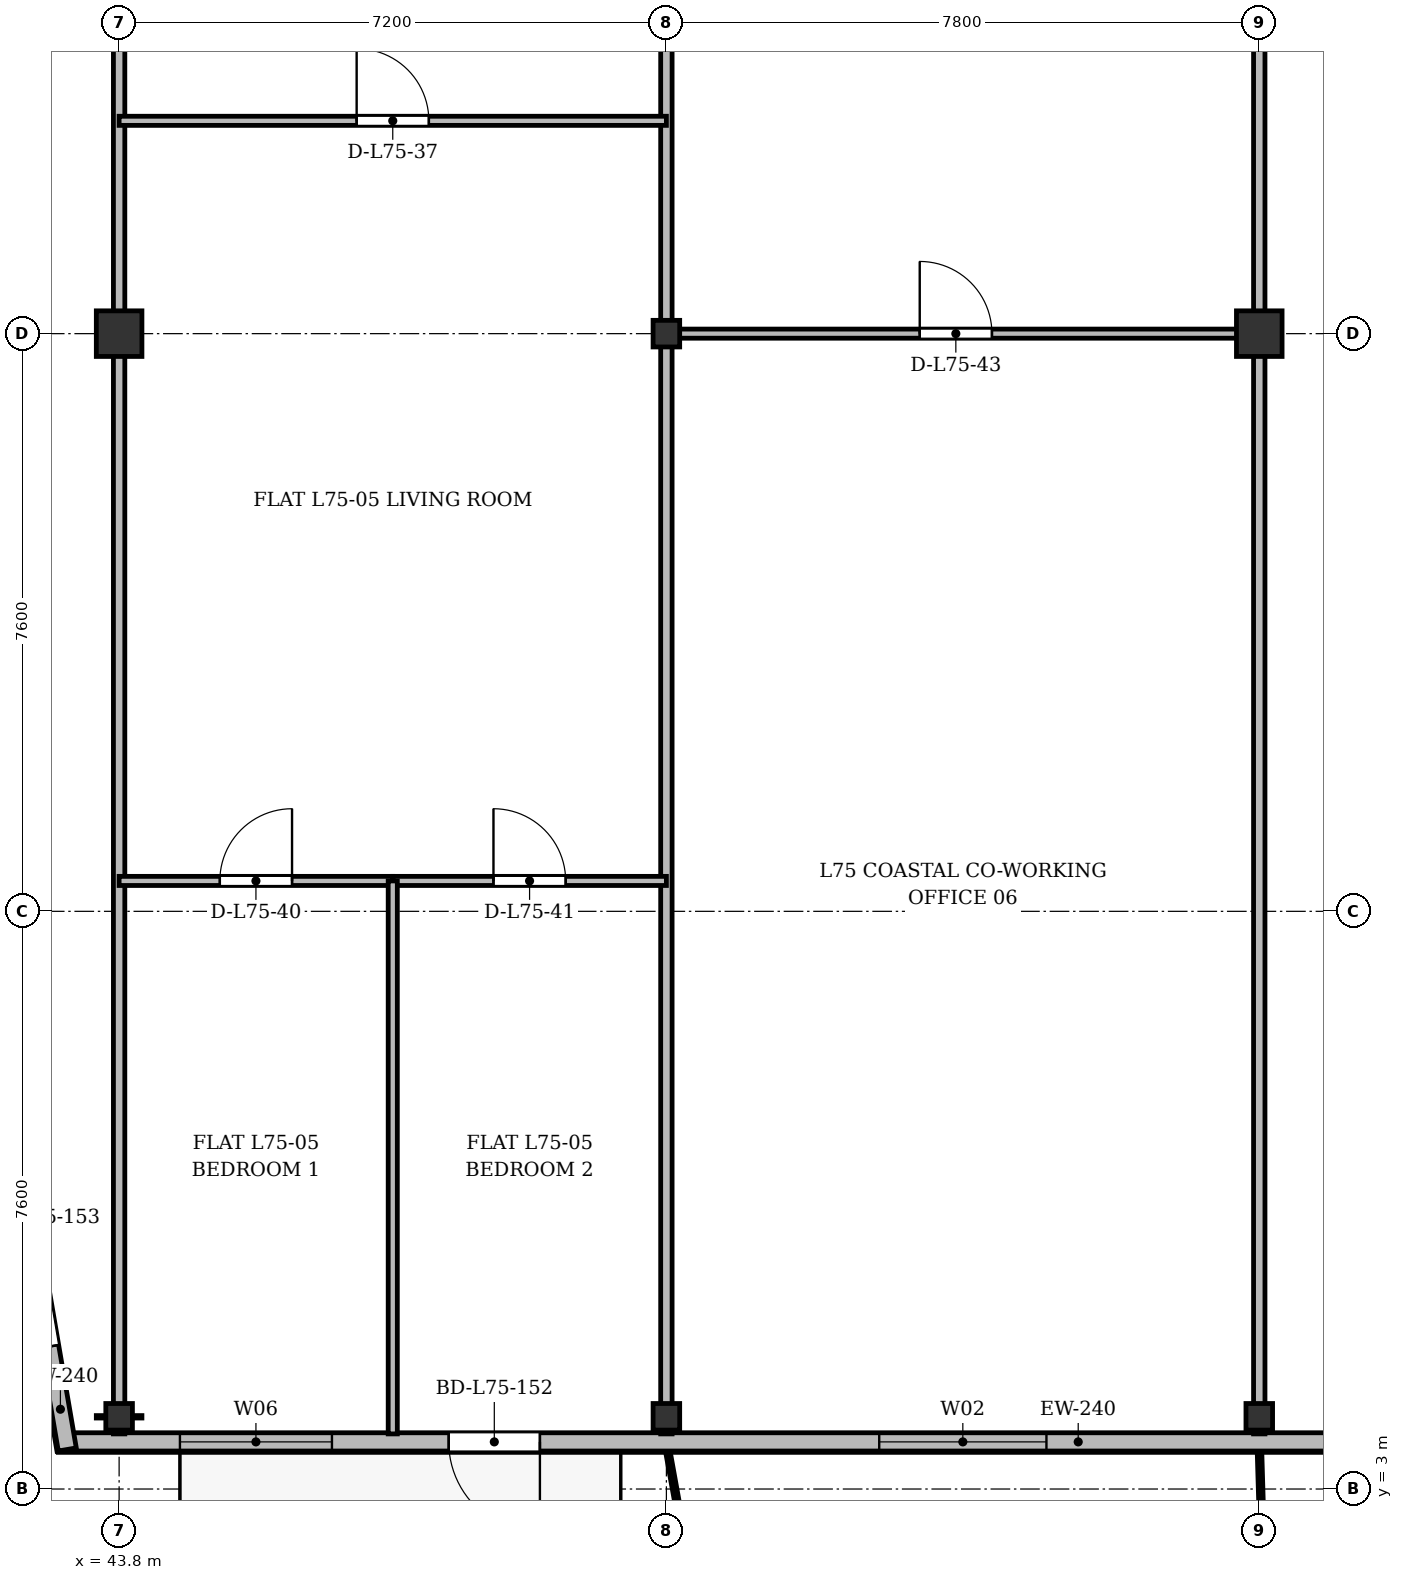
"""IFC4 building model, lengths in metres.
Left out: names, types, materials, properties, quantities, classifications, styles, units other than length and angle.
Written with IfcOpenShell. Run it as: python <this file> out.ifc"""

import sys

from ifc_helpers import new_model, si_unit, direction, frame, frame_2d, origin, origin_2d, place, context, subcontext, project, spatial, rectangle, i_section, extrude, source, transform, mapped, element, fill, save


model = new_model("IFC4")
c1 = context("Model", 3, precision=1e-05, world=origin(), true_north=direction((0.0, 1.0)))
c2 = subcontext(c1, "Body", "Model", "MODEL_VIEW")
j1 = project(units=[si_unit("LENGTHUNIT", "METRE"), si_unit("PLANEANGLEUNIT", "RADIAN")], contexts=[c1])
p1 = place(None, origin())
s1 = spatial("IfcSite", under=j1, at=p1, CompositionType="ELEMENT")
p2 = place(p1, origin())
s2 = spatial("IfcBuilding", under=s1, at=p2, CompositionType="ELEMENT")
p3 = place(p2, frame((0.0, 0.0, 288.3)))
s3 = spatial("IfcBuildingStorey", under=s2, at=p3, CompositionType="ELEMENT", Elevation=288.3)
m1 = source(origin(), c2, "Body", "SweptSolid", [
    extrude(i_section(OverallWidth=0.35, OverallDepth=0.35, WebThickness=0.018, FlangeThickness=0.028, at=origin_2d()), origin(), (0.0, 0.0, 1.0), 3.6),
])
p4 = place(p3, frame((43.8, 3.95, 0.0), z_axis=(0.0, 0.0, 1.0), x_axis=(1.0, 0.0, 0.0)))
e1 = element("IfcColumn", 1, at=p4, inside=s3, PredefinedType="COLUMN", context=c2, shape_type="MappedRepresentation", body=[
    mapped(m1, transform((0.0, 0.0, 0.0), x_axis=(1.0, 0.0, 0.0), y_axis=(0.0, 1.0, 0.0), z_axis=(0.0, 0.0, 1.0), scale=1.0)),
])
m2 = source(origin(), c2, "Body", "SweptSolid", [
    extrude(rectangle(XDim=0.6, YDim=0.6, at=origin_2d()), origin(), (0.0, 0.0, 1.0), 3.6),
])
p5 = place(p3, frame((43.8, 18.2, 0.0), z_axis=(0.0, 0.0, 1.0), x_axis=(1.0, 0.0, 0.0)))
e2 = element("IfcColumn", 2, at=p5, inside=s3, PredefinedType="COLUMN", context=c2, shape_type="MappedRepresentation", body=[
    mapped(m2, transform((0.0, 0.0, 0.0), x_axis=(1.0, 0.0, 0.0), y_axis=(0.0, 1.0, 0.0), z_axis=(0.0, 0.0, 1.0), scale=1.0)),
])
for number, where, z_axis, x_axis in (
    (3, (51.0, 3.95, 0.0), (0.0, 0.0, 1.0), (1.0, 0.0, 0.0)),
    (4, (51.0, 18.2, 0.0), (0.0, 0.0, 1.0), (1.0, 0.0, 0.0)),
    (5, (58.8, 3.95, 0.0), (0.0, 0.0, 1.0), (1.0, 0.0, 0.0)),
):
    element("IfcColumn", number, at=place(p3, frame(where, z_axis=z_axis, x_axis=x_axis)), inside=s3, PredefinedType="COLUMN", context=c2, shape_type="MappedRepresentation", body=[
        mapped(m1, transform((0.0, 0.0, 0.0), x_axis=(1.0, 0.0, 0.0), y_axis=(0.0, 1.0, 0.0), z_axis=(0.0, 0.0, 1.0), scale=1.0)),
    ])
p6 = place(p3, frame((58.8, 18.2, 0.0), z_axis=(0.0, 0.0, 1.0), x_axis=(1.0, 0.0, 0.0)))
e6 = element("IfcColumn", 6, at=p6, inside=s3, PredefinedType="COLUMN", context=c2, shape_type="MappedRepresentation", body=[
    mapped(m2, transform((0.0, 0.0, 0.0), x_axis=(1.0, 0.0, 0.0), y_axis=(0.0, 1.0, 0.0), z_axis=(0.0, 0.0, 1.0), scale=1.0)),
])
p7 = place(p3, frame((63.2, 3.62, 0.0), z_axis=(0.0, 0.0, 1.0), x_axis=(-1.0, 0.0, 0.0)))
e7 = element("IfcWall", 7, at=p7, inside=s3, PredefinedType="SOLIDWALL", context=c2, shape_type="SweptSolid", body=[
    extrude(rectangle(XDim=20.2, YDim=0.24, at=frame_2d((10.1, 0.0))), origin(), (0.0, 0.0, 1.0), 3.37),
])
p8 = place(p7, frame((1.345, 0.0, 0.9)))
e8 = element("IfcOpeningElement", 8, at=p8, cuts=e7, PredefinedType="OPENING", context=c2, shape_type="SweptSolid", body=[
    extrude(rectangle(XDim=1.8, YDim=1.8, at=frame_2d((0.9, 0.9))), frame((0.0, 0.13, 0.0), z_axis=(0.0, -1.0, 0.0), x_axis=(1.0, 0.0, 0.0)), (0.0, 0.0, 1.0), 0.26),
])
p9 = place(p7, frame((7.2, 0.0, 0.9)))
e9 = element("IfcOpeningElement", 9, at=p9, cuts=e7, PredefinedType="OPENING", context=c2, shape_type="SweptSolid", body=[
    extrude(rectangle(XDim=2.2, YDim=1.8, at=frame_2d((1.1, 0.9))), frame((0.0, 0.13, 0.0), z_axis=(0.0, -1.0, 0.0), x_axis=(1.0, 0.0, 0.0)), (0.0, 0.0, 1.0), 0.26),
])
p10 = place(p7, frame((13.864, 0.0, 0.0)))
e10 = element("IfcOpeningElement", 10, at=p10, cuts=e7, PredefinedType="OPENING", context=c2, shape_type="SweptSolid", body=[
    extrude(rectangle(XDim=1.2, YDim=2.2, at=frame_2d((0.6, 1.1))), frame((0.0, 0.13, 0.0), z_axis=(0.0, -1.0, 0.0), x_axis=(1.0, 0.0, 0.0)), (0.0, 0.0, 1.0), 0.26),
])
p11 = place(p7, frame((16.6, 0.0, 0.9)))
e11 = element("IfcOpeningElement", 11, at=p11, cuts=e7, PredefinedType="OPENING", context=c2, shape_type="SweptSolid", body=[
    extrude(rectangle(XDim=2.0, YDim=1.95, at=frame_2d((1.0, 0.975))), frame((0.0, 0.13, 0.0), z_axis=(0.0, -1.0, 0.0), x_axis=(1.0, 0.0, 0.0)), (0.0, 0.0, 1.0), 0.26),
])
p12 = place(p3, frame((43.118, 3.52, 0.0), z_axis=(0.0, 0.0, 1.0), x_axis=(-0.168990530437, 0.98561767467, 0.0)))
e12 = element("IfcWall", 12, at=p12, inside=s3, PredefinedType="SOLIDWALL", context=c2, shape_type="SweptSolid", body=[
    extrude(rectangle(XDim=3.551, YDim=0.24, at=frame_2d((1.775, 0.0))), origin(), (0.0, 0.0, 1.0), 2.92),
])
p13 = place(p12, frame((1.374, 0.0, 0.0)))
e13 = element("IfcOpeningElement", 13, at=p13, cuts=e12, PredefinedType="OPENING", context=c2, shape_type="SweptSolid", body=[
    extrude(rectangle(XDim=1.2, YDim=2.2, at=frame_2d((0.6, 1.1))), frame((0.0, 0.13, 0.0), z_axis=(0.0, -1.0, 0.0), x_axis=(1.0, 0.0, 0.0)), (0.0, 0.0, 1.0), 0.26),
])
for number, where, z_axis, x_axis in (
    (14, (43.8, 3.725, 0.0), (0.0, 0.0, 1.0), (0.0, 1.0, 0.0)),
    (15, (51.0, 3.725, 0.0), (0.0, 0.0, 1.0), (0.0, 1.0, 0.0)),
    (16, (58.8, 3.725, 0.0), (0.0, 0.0, 1.0), (0.0, 1.0, 0.0)),
):
    element("IfcWall", number, at=place(p3, frame(where, z_axis=z_axis, x_axis=x_axis)), inside=s3, PredefinedType="PARTITIONING", context=c2, shape_type="SweptSolid", body=[
        extrude(rectangle(XDim=27.275, YDim=0.15, at=frame_2d((13.637, 0.0))), origin(), (0.0, 0.0, 1.0), 2.87),
    ])
p14 = place(p3, frame((43.8, 21.0, 0.0), z_axis=(0.0, 0.0, 1.0), x_axis=(1.0, 0.0, 0.0)))
e17 = element("IfcWall", 17, at=p14, inside=s3, PredefinedType="PARTITIONING", context=c2, shape_type="SweptSolid", body=[
    extrude(rectangle(XDim=7.2, YDim=0.12, at=frame_2d((3.6, 0.0))), origin(), (0.0, 0.0, 1.0), 2.87),
])
p15 = place(p14, frame((3.125, 0.0, 0.0)))
e18 = element("IfcOpeningElement", 18, at=p15, cuts=e17, PredefinedType="OPENING", context=c2, shape_type="SweptSolid", body=[
    extrude(rectangle(XDim=0.95, YDim=2.15, at=frame_2d((0.475, 1.075))), frame((0.0, 0.07, 0.0), z_axis=(0.0, -1.0, 0.0), x_axis=(1.0, 0.0, 0.0)), (0.0, 0.0, 1.0), 0.14),
])
p16 = place(p3, frame((43.8, 11.0, 0.0), z_axis=(0.0, 0.0, 1.0), x_axis=(1.0, 0.0, 0.0)))
e19 = element("IfcWall", 19, at=p16, inside=s3, PredefinedType="PARTITIONING", context=c2, shape_type="SweptSolid", body=[
    extrude(rectangle(XDim=3.6, YDim=0.12, at=frame_2d((1.8, 0.0))), origin(), (0.0, 0.0, 1.0), 2.87),
])
p17 = place(p16, frame((1.325, 0.0, 0.0)))
e20 = element("IfcOpeningElement", 20, at=p17, cuts=e19, PredefinedType="OPENING", context=c2, shape_type="SweptSolid", body=[
    extrude(rectangle(XDim=0.95, YDim=2.15, at=frame_2d((0.475, 1.075))), frame((0.0, 0.07, 0.0), z_axis=(0.0, -1.0, 0.0), x_axis=(1.0, 0.0, 0.0)), (0.0, 0.0, 1.0), 0.14),
])
p18 = place(p3, frame((47.4, 11.0, 0.0), z_axis=(0.0, 0.0, 1.0), x_axis=(1.0, 0.0, 0.0)))
e21 = element("IfcWall", 21, at=p18, inside=s3, PredefinedType="PARTITIONING", context=c2, shape_type="SweptSolid", body=[
    extrude(rectangle(XDim=3.6, YDim=0.12, at=frame_2d((1.8, 0.0))), origin(), (0.0, 0.0, 1.0), 2.87),
])
p19 = place(p18, frame((1.325, 0.0, 0.0)))
e22 = element("IfcOpeningElement", 22, at=p19, cuts=e21, PredefinedType="OPENING", context=c2, shape_type="SweptSolid", body=[
    extrude(rectangle(XDim=0.95, YDim=2.15, at=frame_2d((0.475, 1.075))), frame((0.0, 0.07, 0.0), z_axis=(0.0, -1.0, 0.0), x_axis=(1.0, 0.0, 0.0)), (0.0, 0.0, 1.0), 0.14),
])
p20 = place(p3, frame((47.4, 3.725, 0.0), z_axis=(0.0, 0.0, 1.0), x_axis=(0.0, 1.0, 0.0)))
e23 = element("IfcWall", 23, at=p20, inside=s3, PredefinedType="PARTITIONING", context=c2, shape_type="SweptSolid", body=[
    extrude(rectangle(XDim=7.275, YDim=0.12, at=frame_2d((3.637, 0.0))), origin(), (0.0, 0.0, 1.0), 2.92),
])
p21 = place(p3, frame((51.0, 18.2, 0.0), z_axis=(0.0, 0.0, 1.0), x_axis=(1.0, 0.0, 0.0)))
e24 = element("IfcWall", 24, at=p21, inside=s3, PredefinedType="PARTITIONING", context=c2, shape_type="SweptSolid", body=[
    extrude(rectangle(XDim=7.8, YDim=0.12, at=frame_2d((3.9, 0.0))), origin(), (0.0, 0.0, 1.0), 2.92),
])
p22 = place(p21, frame((3.333, 0.0, 0.0)))
e25 = element("IfcOpeningElement", 25, at=p22, cuts=e24, PredefinedType="OPENING", context=c2, shape_type="SweptSolid", body=[
    extrude(rectangle(XDim=0.95, YDim=2.15, at=frame_2d((0.475, 1.075))), frame((0.0, 0.07, 0.0), z_axis=(0.0, -1.0, 0.0), x_axis=(1.0, 0.0, 0.0)), (0.0, 0.0, 1.0), 0.14),
])
m3 = source(origin(), c2, "Body", "SweptSolid", [
    extrude(rectangle(XDim=2.2, YDim=1.8, at=frame_2d((1.1, 0.9))), frame((0.0, 0.03, 0.0), z_axis=(0.0, -1.0, 0.0), x_axis=(1.0, 0.0, 0.0)), (0.0, 0.0, 1.0), 0.06),
])
p23 = place(p9, origin())
e26 = element("IfcWindow", 26, at=p23, inside=s3, PartitioningType="SINGLE_PANEL", PredefinedType="WINDOW", context=c2, shape_type="MappedRepresentation", body=[
    mapped(m3, transform((0.0, 0.0, 0.0), x_axis=(1.0, 0.0, 0.0), y_axis=(0.0, 1.0, 0.0), z_axis=(0.0, 0.0, 1.0), scale=1.0)),
])
fill(e9, e26)
m4 = source(origin(), c2, "Body", "SweptSolid", [
    extrude(rectangle(XDim=1.2, YDim=2.2, at=frame_2d((0.6, 1.1))), frame((0.0, 0.025, 0.0), z_axis=(0.0, -1.0, 0.0), x_axis=(1.0, 0.0, 0.0)), (0.0, 0.0, 1.0), 0.05),
])
p24 = place(p10, origin())
e27 = element("IfcDoor", 27, at=p24, inside=s3, OperationType="SINGLE_SWING_LEFT", PredefinedType="DOOR", context=c2, shape_type="MappedRepresentation", body=[
    mapped(m4, transform((0.0, 0.0, 0.0), x_axis=(1.0, 0.0, 0.0), y_axis=(0.0, 1.0, 0.0), z_axis=(0.0, 0.0, 1.0), scale=1.0)),
])
fill(e10, e27)
m5 = source(origin(), c2, "Body", "SweptSolid", [
    extrude(rectangle(XDim=2.0, YDim=1.95, at=frame_2d((1.0, 0.975))), frame((0.0, 0.03, 0.0), z_axis=(0.0, -1.0, 0.0), x_axis=(1.0, 0.0, 0.0)), (0.0, 0.0, 1.0), 0.06),
])
p25 = place(p11, origin())
e28 = element("IfcWindow", 28, at=p25, inside=s3, PartitioningType="SINGLE_PANEL", PredefinedType="WINDOW", context=c2, shape_type="MappedRepresentation", body=[
    mapped(m5, transform((0.0, 0.0, 0.0), x_axis=(1.0, 0.0, 0.0), y_axis=(0.0, 1.0, 0.0), z_axis=(0.0, 0.0, 1.0), scale=1.0)),
])
fill(e11, e28)
m6 = source(origin(), c2, "Body", "SweptSolid", [
    extrude(rectangle(XDim=0.95, YDim=2.15, at=frame_2d((0.475, 1.075))), frame((0.0, 0.025, 0.0), z_axis=(0.0, -1.0, 0.0), x_axis=(1.0, 0.0, 0.0)), (0.0, 0.0, 1.0), 0.05),
])
p26 = place(p15, origin())
e29 = element("IfcDoor", 29, at=p26, inside=s3, OperationType="SINGLE_SWING_LEFT", PredefinedType="DOOR", context=c2, shape_type="MappedRepresentation", body=[
    mapped(m6, transform((0.0, 0.0, 0.0), x_axis=(1.0, 0.0, 0.0), y_axis=(0.0, 1.0, 0.0), z_axis=(0.0, 0.0, 1.0), scale=1.0)),
])
fill(e18, e29)
p27 = place(p17, origin())
e30 = element("IfcDoor", 30, at=p27, inside=s3, OperationType="SINGLE_SWING_RIGHT", PredefinedType="DOOR", context=c2, shape_type="MappedRepresentation", body=[
    mapped(m6, transform((0.0, 0.0, 0.0), x_axis=(1.0, 0.0, 0.0), y_axis=(0.0, 1.0, 0.0), z_axis=(0.0, 0.0, 1.0), scale=1.0)),
])
fill(e20, e30)
p28 = place(p19, origin())
e31 = element("IfcDoor", 31, at=p28, inside=s3, OperationType="SINGLE_SWING_LEFT", PredefinedType="DOOR", context=c2, shape_type="MappedRepresentation", body=[
    mapped(m6, transform((0.0, 0.0, 0.0), x_axis=(1.0, 0.0, 0.0), y_axis=(0.0, 1.0, 0.0), z_axis=(0.0, 0.0, 1.0), scale=1.0)),
])
fill(e22, e31)
p29 = place(p22, origin())
e32 = element("IfcDoor", 32, at=p29, inside=s3, OperationType="SINGLE_SWING_LEFT", PredefinedType="DOOR", context=c2, shape_type="MappedRepresentation", body=[
    mapped(m6, transform((0.0, 0.0, 0.0), x_axis=(1.0, 0.0, 0.0), y_axis=(0.0, 1.0, 0.0), z_axis=(0.0, 0.0, 1.0), scale=1.0)),
])
fill(e25, e32)
save(model, sys.argv[1])
